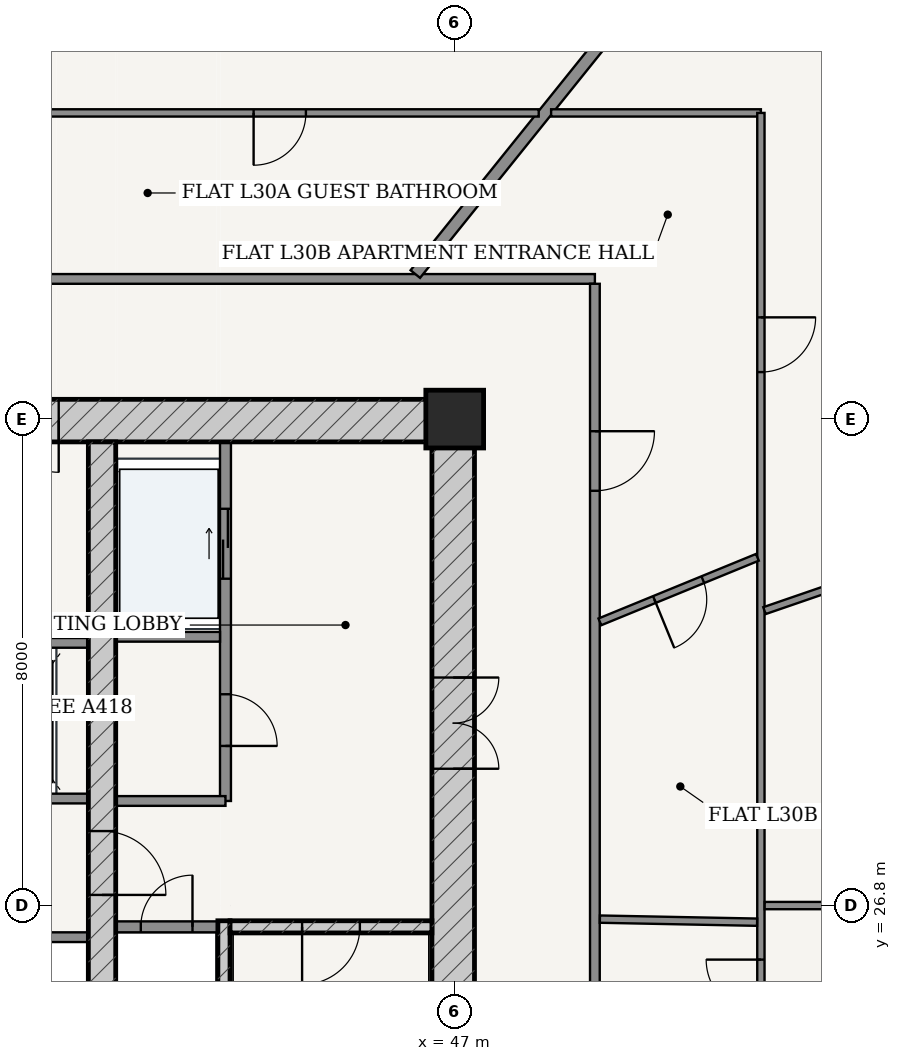
"""IFC4 building model, lengths in metres.
Left out: names, types, materials, properties, quantities, classifications, styles, units other than length and angle.
Written with IfcOpenShell. Run it as: python <this file> out.ifc"""

import sys

from ifc_helpers import new_model, si_unit, direction, frame, frame_2d, origin, origin_2d, place, context, subcontext, project, spatial, rectangle, extrude, source, transform, mapped, element, fill, save


model = new_model("IFC4")
c1 = context("Model", 3, precision=1e-05, world=origin(), true_north=direction((-0.2419218956, 0.970295726276)))
c2 = subcontext(c1, "Body", "Model", "MODEL_VIEW")
j1 = project(units=[si_unit("LENGTHUNIT", "METRE"), si_unit("PLANEANGLEUNIT", "RADIAN")], contexts=[c1])
p1 = place(None, origin())
s1 = spatial("IfcSite", under=j1, at=p1, CompositionType="ELEMENT")
p2 = place(p1, origin())
s2 = spatial("IfcBuilding", under=s1, at=p2, CompositionType="ELEMENT")
p3 = place(p2, frame((0.0, 0.0, 115.8)))
s3 = spatial("IfcBuildingStorey", under=s2, at=p3, CompositionType="ELEMENT", Elevation=115.8)
p4 = place(p3, frame((47.0, 34.8, 0.0), z_axis=(0.0, 0.0, 1.0), x_axis=(1.0, 0.0, 0.0)))
e1 = element("IfcColumn", 1, at=p4, inside=s3, PredefinedType="COLUMN", context=c2, shape_type="SweptSolid", body=[
    extrude(rectangle(XDim=0.95, YDim=0.95, at=origin_2d()), origin(), (0.0, 0.0, 1.0), 3.6),
])
p5 = place(p3, frame((28.675, 34.775, 0.0), z_axis=(0.0, 0.0, 1.0), x_axis=(1.0, 0.0, 0.0)))
e2 = element("IfcWall", 2, at=p5, inside=s3, PredefinedType="SHEAR", context=c2, shape_type="SweptSolid", body=[
    extrude(rectangle(XDim=18.65, YDim=0.7, at=frame_2d((9.325, 0.0))), origin(), (0.0, 0.0, 1.0), 3.325),
])
p6 = place(p5, frame((6.837, 0.0, 0.0)))
e3 = element("IfcOpeningElement", 3, at=p6, cuts=e2, PredefinedType="OPENING", context=c2, shape_type="SweptSolid", body=[
    extrude(rectangle(XDim=0.85, YDim=2.1, at=frame_2d((0.425, 1.05))), frame((0.0, 0.36, 0.0), z_axis=(0.0, -1.0, 0.0), x_axis=(1.0, 0.0, 0.0)), (0.0, 0.0, 1.0), 0.72),
])
p7 = place(p5, frame((8.895, 0.0, 0.0)))
e4 = element("IfcOpeningElement", 4, at=p7, cuts=e2, PredefinedType="OPENING", context=c2, shape_type="SweptSolid", body=[
    extrude(rectangle(XDim=0.86, YDim=2.1, at=frame_2d((0.43, 1.05))), frame((0.0, 0.36, 0.0), z_axis=(0.0, -1.0, 0.0), x_axis=(1.0, 0.0, 0.0)), (0.0, 0.0, 1.0), 0.72),
])
p8 = place(p5, frame((10.962, 0.0, 0.0)))
e5 = element("IfcOpeningElement", 5, at=p8, cuts=e2, PredefinedType="OPENING", context=c2, shape_type="SweptSolid", body=[
    extrude(rectangle(XDim=0.85, YDim=2.1, at=frame_2d((0.425, 1.05))), frame((0.0, 0.36, 0.0), z_axis=(0.0, -1.0, 0.0), x_axis=(1.0, 0.0, 0.0)), (0.0, 0.0, 1.0), 0.72),
])
p9 = place(p3, frame((46.975, 19.175, 0.0), z_axis=(0.0, 0.0, 1.0), x_axis=(0.0, 1.0, 0.0)))
e6 = element("IfcWall", 6, at=p9, inside=s3, PredefinedType="SHEAR", context=c2, shape_type="SweptSolid", body=[
    extrude(rectangle(XDim=15.25, YDim=0.7, at=frame_2d((7.625, 0.0))), origin(), (0.0, 0.0, 1.0), 3.325),
])
p10 = place(p9, frame((9.875, 0.0, 0.0)))
e7 = element("IfcOpeningElement", 7, at=p10, cuts=e6, PredefinedType="OPENING", context=c2, shape_type="SweptSolid", body=[
    extrude(rectangle(XDim=1.5, YDim=2.2, at=frame_2d((0.75, 1.1))), frame((0.0, 0.36, 0.0), z_axis=(0.0, -1.0, 0.0), x_axis=(1.0, 0.0, 0.0)), (0.0, 0.0, 1.0), 0.72),
])
p11 = place(p3, frame((43.205, 19.175, 0.0), z_axis=(0.0, 0.0, 1.0), x_axis=(0.0, 1.0, 0.0)))
e8 = element("IfcWall", 8, at=p11, inside=s3, PredefinedType="SOLIDWALL", context=c2, shape_type="SweptSolid", body=[
    extrude(rectangle(XDim=7.375, YDim=0.2, at=frame_2d((3.688, 0.0))), origin(), (0.0, 0.0, 1.0), 3.325),
])
p12 = place(p3, frame((43.305, 26.45, 0.0), z_axis=(0.0, 0.0, 1.0), x_axis=(1.0, 0.0, 0.0)))
e9 = element("IfcWall", 9, at=p12, inside=s3, PredefinedType="SOLIDWALL", context=c2, shape_type="SweptSolid", body=[
    extrude(rectangle(XDim=3.32, YDim=0.2, at=frame_2d((1.66, 0.0))), origin(), (0.0, 0.0, 1.0), 3.325),
])
p13 = place(p12, frame((1.185, 0.0, 0.0)))
e10 = element("IfcOpeningElement", 10, at=p13, cuts=e9, PredefinedType="OPENING", context=c2, shape_type="SweptSolid", body=[
    extrude(rectangle(XDim=0.95, YDim=2.15, at=frame_2d((0.475, 1.075))), frame((0.0, 0.11, 0.0), z_axis=(0.0, -1.0, 0.0), x_axis=(1.0, 0.0, 0.0)), (0.0, 0.0, 1.0), 0.22),
])
p14 = place(p3, frame((41.2, 19.175, 0.0), z_axis=(0.0, 0.0, 1.0), x_axis=(0.0, 1.0, 0.0)))
e11 = element("IfcWall", 11, at=p14, inside=s3, PredefinedType="SHEAR", context=c2, shape_type="SweptSolid", body=[
    extrude(rectangle(XDim=15.25, YDim=0.45, at=frame_2d((7.625, 0.0))), origin(), (0.0, 0.0, 1.0), 3.325),
])
p15 = place(p14, frame((7.8, 0.0, 0.0)))
e12 = element("IfcOpeningElement", 12, at=p15, cuts=e11, PredefinedType="OPENING", context=c2, shape_type="SweptSolid", body=[
    extrude(rectangle(XDim=1.05, YDim=2.15, at=frame_2d((0.525, 1.075))), frame((0.0, 0.235, 0.0), z_axis=(0.0, -1.0, 0.0), x_axis=(1.0, 0.0, 0.0)), (0.0, 0.0, 1.0), 0.47),
])
p16 = place(p3, frame((60.154, 39.01, 0.0), z_axis=(0.0, 0.0, 1.0), x_axis=(-0.769242574941, 0.638956853706, 0.0)))
e13 = element("IfcWall", 13, at=p16, inside=s3, PredefinedType="SOLIDWALL", context=c2, shape_type="SweptSolid", body=[
    extrude(rectangle(XDim=9.69, YDim=0.26, at=frame_2d((4.845, 0.0))), origin(), (0.0, 0.0, 1.0), 3.325),
])
p17 = place(p16, frame((4.17, 0.0, 0.0)))
e14 = element("IfcOpeningElement", 14, at=p17, cuts=e13, PredefinedType="OPENING", context=c2, shape_type="SweptSolid", body=[
    extrude(rectangle(XDim=1.35, YDim=2.2, at=frame_2d((0.675, 1.1))), frame((0.0, 0.14, 0.0), z_axis=(0.0, -1.0, 0.0), x_axis=(1.0, 0.0, 0.0)), (0.0, 0.0, 1.0), 0.28),
])
p18 = place(p3, frame((41.425, 26.45, 0.0), z_axis=(0.0, 0.0, 1.0), x_axis=(1.0, 0.0, 0.0)))
e15 = element("IfcWall", 15, at=p18, inside=s3, PredefinedType="PARTITIONING", context=c2, shape_type="SweptSolid", body=[
    extrude(rectangle(XDim=1.675, YDim=0.18, at=frame_2d((0.837, 0.0))), origin(), (0.0, 0.0, 1.0), 3.325),
])
p19 = place(p18, frame((0.413, 0.0, 0.0)))
e16 = element("IfcOpeningElement", 16, at=p19, cuts=e15, PredefinedType="OPENING", context=c2, shape_type="SweptSolid", body=[
    extrude(rectangle(XDim=0.85, YDim=2.1, at=frame_2d((0.425, 1.05))), frame((0.0, 0.1, 0.0), z_axis=(0.0, -1.0, 0.0), x_axis=(1.0, 0.0, 0.0)), (0.0, 0.0, 1.0), 0.2),
])
p20 = place(p3, frame((43.23, 28.52, 0.0), z_axis=(0.0, 0.0, 1.0), x_axis=(0.0, 1.0, 0.0)))
e17 = element("IfcWall", 17, at=p20, inside=s3, PredefinedType="PARTITIONING", context=c2, shape_type="SweptSolid", body=[
    extrude(rectangle(XDim=5.905, YDim=0.18, at=frame_2d((2.953, 0.0))), origin(), (0.0, 0.0, 1.0), 3.325),
])
p21 = place(p20, frame((0.905, 0.0, 0.0)))
e18 = element("IfcOpeningElement", 18, at=p21, cuts=e17, PredefinedType="OPENING", context=c2, shape_type="SweptSolid", body=[
    extrude(rectangle(XDim=0.85, YDim=2.1, at=frame_2d((0.425, 1.05))), frame((0.0, 0.1, 0.0), z_axis=(0.0, -1.0, 0.0), x_axis=(1.0, 0.0, 0.0)), (0.0, 0.0, 1.0), 0.2),
])
p22 = place(p20, frame((3.655, 0.0, 0.0)))
e19 = element("IfcOpeningElement", 19, at=p22, cuts=e17, PredefinedType="OPENING", context=c2, shape_type="SweptSolid", body=[
    extrude(rectangle(XDim=1.15, YDim=2.2, at=frame_2d((0.575, 1.1))), frame((0.0, 0.1, 0.0), z_axis=(0.0, -1.0, 0.0), x_axis=(1.0, 0.0, 0.0)), (0.0, 0.0, 1.0), 0.2),
])
p23 = place(p3, frame((41.425, 31.22, 0.0), z_axis=(0.0, 0.0, 1.0), x_axis=(1.0, 0.0, 0.0)))
e20 = element("IfcWall", 20, at=p23, inside=s3, PredefinedType="PARTITIONING", context=c2, shape_type="SweptSolid", body=[
    extrude(rectangle(XDim=1.715, YDim=0.16, at=frame_2d((0.857, 0.0))), origin(), (0.0, 0.0, 1.0), 3.325),
])
p24 = place(p3, frame((41.425, 28.52, 0.0), z_axis=(0.0, 0.0, 1.0), x_axis=(1.0, 0.0, 0.0)))
e21 = element("IfcWall", 21, at=p24, inside=s3, PredefinedType="PARTITIONING", context=c2, shape_type="SweptSolid", body=[
    extrude(rectangle(XDim=1.805, YDim=0.16, at=frame_2d((0.902, 0.0))), origin(), (0.0, 0.0, 1.0), 3.325),
])
p25 = place(p3, frame((35.025, 28.56, 0.0), z_axis=(0.0, 0.0, 1.0), x_axis=(1.0, 0.0, 0.0)))
e22 = element("IfcWall", 22, at=p25, inside=s3, PredefinedType="PARTITIONING", context=c2, shape_type="SweptSolid", body=[
    extrude(rectangle(XDim=5.95, YDim=0.16, at=frame_2d((2.975, 0.0))), origin(), (0.0, 0.0, 1.0), 3.325),
])
p26 = place(p25, frame((0.76, 0.0, 0.0)))
e23 = element("IfcOpeningElement", 23, at=p26, cuts=e22, PredefinedType="OPENING", context=c2, shape_type="SweptSolid", body=[
    extrude(rectangle(XDim=1.1, YDim=2.2, at=frame_2d((0.55, 1.1))), frame((0.0, 0.09, 0.0), z_axis=(0.0, -1.0, 0.0), x_axis=(1.0, 0.0, 0.0)), (0.0, 0.0, 1.0), 0.18),
])
p27 = place(p25, frame((2.425, 0.0, 0.0)))
e24 = element("IfcOpeningElement", 24, at=p27, cuts=e22, PredefinedType="OPENING", context=c2, shape_type="SweptSolid", body=[
    extrude(rectangle(XDim=1.1, YDim=2.2, at=frame_2d((0.55, 1.1))), frame((0.0, 0.09, 0.0), z_axis=(0.0, -1.0, 0.0), x_axis=(1.0, 0.0, 0.0)), (0.0, 0.0, 1.0), 0.18),
])
p28 = place(p25, frame((4.09, 0.0, 0.0)))
e25 = element("IfcOpeningElement", 25, at=p28, cuts=e22, PredefinedType="OPENING", context=c2, shape_type="SweptSolid", body=[
    extrude(rectangle(XDim=1.1, YDim=2.2, at=frame_2d((0.55, 1.1))), frame((0.0, 0.09, 0.0), z_axis=(0.0, -1.0, 0.0), x_axis=(1.0, 0.0, 0.0)), (0.0, 0.0, 1.0), 0.18),
])
for number, where, z_axis, x_axis in (
    (26, (35.025, 31.12, 0.0), (0.0, 0.0, 1.0), (1.0, 0.0, 0.0)),
    (27, (35.025, 26.28, 0.0), (0.0, 0.0, 1.0), (1.0, 0.0, 0.0)),
):
    element("IfcWall", number, at=place(p3, frame(where, z_axis=z_axis, x_axis=x_axis)), inside=s3, PredefinedType="PARTITIONING", context=c2, shape_type="SweptSolid", body=[
        extrude(rectangle(XDim=5.95, YDim=0.16, at=frame_2d((2.975, 0.0))), origin(), (0.0, 0.0, 1.0), 3.325),
    ])
p29 = place(p3, frame((26.695, 37.105, 0.0), z_axis=(0.0, 0.0, 1.0), x_axis=(1.0, 0.0, 0.0)))
e28 = element("IfcWall", 28, at=p29, inside=s3, PredefinedType="PARTITIONING", context=c2, shape_type="SweptSolid", body=[
    extrude(rectangle(XDim=22.61, YDim=0.16, at=frame_2d((11.305, 0.0))), origin(), (0.0, 0.0, 1.0), 2.767),
])
p30 = place(p3, frame((49.305, 16.575, 0.0), z_axis=(0.0, 0.0, 1.0), x_axis=(0.0, 1.0, 0.0)))
e29 = element("IfcWall", 29, at=p30, inside=s3, PredefinedType="PARTITIONING", context=c2, shape_type="SweptSolid", body=[
    extrude(rectangle(XDim=20.45, YDim=0.16, at=frame_2d((10.225, 0.0))), origin(), (0.0, 0.0, 1.0), 2.767),
])
p31 = place(p30, frame((17.046, 0.0, 0.0)))
e30 = element("IfcOpeningElement", 30, at=p31, cuts=e29, PredefinedType="OPENING", context=c2, shape_type="SweptSolid", body=[
    extrude(rectangle(XDim=0.98, YDim=2.2, at=frame_2d((0.49, 1.1))), frame((0.0, 0.09, 0.0), z_axis=(0.0, -1.0, 0.0), x_axis=(1.0, 0.0, 0.0)), (0.0, 0.0, 1.0), 0.18),
])
p32 = place(p3, frame((46.352, 37.185, 0.0), z_axis=(0.0, 0.0, 1.0), x_axis=(0.626712884514, 0.779250255299, 0.0)))
e31 = element("IfcWall", 31, at=p32, inside=s3, PredefinedType="PARTITIONING", context=c2, shape_type="SweptSolid", body=[
    extrude(rectangle(XDim=10.141, YDim=0.2, at=frame_2d((5.07, 0.0))), origin(), (0.0, 0.0, 1.0), 2.767),
])
p33 = place(p3, frame((23.965, 39.835, 0.0), z_axis=(0.0, 0.0, 1.0), x_axis=(1.0, 0.0, 0.0)))
e32 = element("IfcWall", 32, at=p33, inside=s3, PredefinedType="PARTITIONING", context=c2, shape_type="SweptSolid", body=[
    extrude(rectangle(XDim=24.416, YDim=0.12, at=frame_2d((12.208, 0.0))), origin(), (0.0, 0.0, 1.0), 2.767),
])
p34 = place(p33, frame((4.192, 0.0, 0.0)))
e33 = element("IfcOpeningElement", 33, at=p34, cuts=e32, PredefinedType="OPENING", context=c2, shape_type="SweptSolid", body=[
    extrude(rectangle(XDim=0.9, YDim=2.15, at=frame_2d((0.45, 1.075))), frame((0.0, 0.07, 0.0), z_axis=(0.0, -1.0, 0.0), x_axis=(1.0, 0.0, 0.0)), (0.0, 0.0, 1.0), 0.14),
])
p35 = place(p33, frame((19.728, 0.0, 0.0)))
e34 = element("IfcOpeningElement", 34, at=p35, cuts=e32, PredefinedType="OPENING", context=c2, shape_type="SweptSolid", body=[
    extrude(rectangle(XDim=0.86, YDim=2.15, at=frame_2d((0.43, 1.075))), frame((0.0, 0.07, 0.0), z_axis=(0.0, -1.0, 0.0), x_axis=(1.0, 0.0, 0.0)), (0.0, 0.0, 1.0), 0.14),
])
p36 = place(p3, frame((48.585, 39.835, 0.0), z_axis=(0.0, 0.0, 1.0), x_axis=(1.0, 0.0, 0.0)))
e35 = element("IfcWall", 35, at=p36, inside=s3, PredefinedType="PARTITIONING", context=c2, shape_type="SweptSolid", body=[
    extrude(rectangle(XDim=3.45, YDim=0.12, at=frame_2d((1.725, 0.0))), origin(), (0.0, 0.0, 1.0), 2.767),
])
p37 = place(p3, frame((52.035, 39.835, 0.0), z_axis=(0.0, 0.0, 1.0), x_axis=(0.0, -1.0, 0.0)))
e36 = element("IfcWall", 36, at=p37, inside=s3, PredefinedType="PARTITIONING", context=c2, shape_type="SweptSolid", body=[
    extrude(rectangle(XDim=26.07, YDim=0.12, at=frame_2d((13.035, 0.0))), origin(), (0.0, 0.0, 1.0), 2.767),
])
p38 = place(p37, frame((3.362, 0.0, 0.0)))
e37 = element("IfcOpeningElement", 37, at=p38, cuts=e36, PredefinedType="OPENING", context=c2, shape_type="SweptSolid", body=[
    extrude(rectangle(XDim=0.9, YDim=2.15, at=frame_2d((0.45, 1.075))), frame((0.0, 0.07, 0.0), z_axis=(0.0, -1.0, 0.0), x_axis=(1.0, 0.0, 0.0)), (0.0, 0.0, 1.0), 0.14),
])
p39 = place(p37, frame((13.924, 0.0, 0.0)))
e38 = element("IfcOpeningElement", 38, at=p39, cuts=e36, PredefinedType="OPENING", context=c2, shape_type="SweptSolid", body=[
    extrude(rectangle(XDim=0.9, YDim=2.15, at=frame_2d((0.45, 1.075))), frame((0.0, 0.07, 0.0), z_axis=(0.0, -1.0, 0.0), x_axis=(1.0, 0.0, 0.0)), (0.0, 0.0, 1.0), 0.14),
])
p40 = place(p3, frame((52.097, 26.8, 0.0), z_axis=(0.0, 0.0, 1.0), x_axis=(1.0, 0.0, 0.0)))
e39 = element("IfcWall", 39, at=p40, inside=s3, PredefinedType="PARTITIONING", context=c2, shape_type="SweptSolid", body=[
    extrude(rectangle(XDim=12.443, YDim=0.12, at=frame_2d((6.222, 0.0))), origin(), (0.0, 0.0, 1.0), 2.767),
])
p41 = place(p40, frame((5.771, 0.0, 0.0)))
e40 = element("IfcOpeningElement", 40, at=p41, cuts=e39, PredefinedType="OPENING", context=c2, shape_type="SweptSolid", body=[
    extrude(rectangle(XDim=0.9, YDim=2.15, at=frame_2d((0.45, 1.075))), frame((0.0, 0.07, 0.0), z_axis=(0.0, -1.0, 0.0), x_axis=(1.0, 0.0, 0.0)), (0.0, 0.0, 1.0), 0.14),
])
p42 = place(p3, frame((52.094, 31.65, 0.0), z_axis=(0.0, 0.0, 1.0), x_axis=(0.945573120726, 0.32540970078, 0.0)))
e41 = element("IfcWall", 41, at=p42, inside=s3, PredefinedType="PARTITIONING", context=c2, shape_type="SweptSolid", body=[
    extrude(rectangle(XDim=11.022, YDim=0.12, at=frame_2d((5.511, 0.0))), origin(), (0.0, 0.0, 1.0), 2.767),
])
p43 = place(p42, frame((5.061, 0.0, 0.0)))
e42 = element("IfcOpeningElement", 42, at=p43, cuts=e41, PredefinedType="OPENING", context=c2, shape_type="SweptSolid", body=[
    extrude(rectangle(XDim=0.9, YDim=2.15, at=frame_2d((0.45, 1.075))), frame((0.0, 0.07, 0.0), z_axis=(0.0, -1.0, 0.0), x_axis=(1.0, 0.0, 0.0)), (0.0, 0.0, 1.0), 0.14),
])
p44 = place(p3, frame((49.387, 26.577, 0.0), z_axis=(0.0, 0.0, 1.0), x_axis=(0.999807240787, -0.019633676934, 0.0)))
e43 = element("IfcWall", 43, at=p44, inside=s3, PredefinedType="PARTITIONING", context=c2, shape_type="SweptSolid", body=[
    extrude(rectangle(XDim=2.586, YDim=0.12, at=frame_2d((1.293, 0.0))), origin(), (0.0, 0.0, 1.0), 3.325),
])
p45 = place(p3, frame((49.387, 31.465, 0.0), z_axis=(0.0, 0.0, 1.0), x_axis=(0.925328713836, 0.37916588896, 0.0)))
e44 = element("IfcWall", 44, at=p45, inside=s3, PredefinedType="PARTITIONING", context=c2, shape_type="SweptSolid", body=[
    extrude(rectangle(XDim=2.8, YDim=0.12, at=frame_2d((1.4, 0.0))), origin(), (0.0, 0.0, 1.0), 3.325),
])
p46 = place(p45, frame((0.97, 0.0, 0.0)))
e45 = element("IfcOpeningElement", 45, at=p46, cuts=e44, PredefinedType="OPENING", context=c2, shape_type="SweptSolid", body=[
    extrude(rectangle(XDim=0.86, YDim=2.15, at=frame_2d((0.43, 1.075))), frame((0.0, 0.07, 0.0), z_axis=(0.0, -1.0, 0.0), x_axis=(1.0, 0.0, 0.0)), (0.0, 0.0, 1.0), 0.14),
])
m1 = source(origin(), c2, "Body", "SweptSolid", [
    extrude(rectangle(XDim=1.5, YDim=2.2, at=frame_2d((0.75, 1.1))), frame((0.0, 0.025, 0.0), z_axis=(0.0, -1.0, 0.0), x_axis=(1.0, 0.0, 0.0)), (0.0, 0.0, 1.0), 0.05),
])
p47 = place(p10, frame((1.5, 0.0, 0.0), z_axis=(0.0, 0.0, 1.0), x_axis=(-1.0, 0.0, 0.0)))
e46 = element("IfcDoor", 46, at=p47, inside=s3, OperationType="DOUBLE_DOOR_SINGLE_SWING", PredefinedType="DOOR", context=c2, shape_type="MappedRepresentation", body=[
    mapped(m1, transform((0.0, 0.0, 0.0), scale=1.0)),
])
fill(e7, e46)
m2 = source(origin(), c2, "Body", "SweptSolid", [
    extrude(rectangle(XDim=1.05, YDim=2.15, at=frame_2d((0.525, 1.075))), frame((0.0, 0.025, 0.0), z_axis=(0.0, -1.0, 0.0), x_axis=(1.0, 0.0, 0.0)), (0.0, 0.0, 1.0), 0.05),
])
p48 = place(p15, frame((1.05, 0.0, 0.0), z_axis=(0.0, 0.0, 1.0), x_axis=(-1.0, 0.0, 0.0)))
e47 = element("IfcDoor", 47, at=p48, inside=s3, OperationType="SINGLE_SWING_RIGHT", PredefinedType="DOOR", context=c2, shape_type="MappedRepresentation", body=[
    mapped(m2, transform((0.0, 0.0, 0.0), scale=1.0)),
])
fill(e12, e47)
m3 = source(origin(), c2, "Body", "SweptSolid", [
    extrude(rectangle(XDim=0.95, YDim=2.15, at=frame_2d((0.475, 1.075))), frame((0.0, 0.025, 0.0), z_axis=(0.0, -1.0, 0.0), x_axis=(1.0, 0.0, 0.0)), (0.0, 0.0, 1.0), 0.05),
])
p49 = place(p13, frame((0.95, 0.0, 0.0), z_axis=(0.0, 0.0, 1.0), x_axis=(-1.0, 0.0, 0.0)))
e48 = element("IfcDoor", 48, at=p49, inside=s3, OperationType="SINGLE_SWING_RIGHT", PredefinedType="DOOR", context=c2, shape_type="MappedRepresentation", body=[
    mapped(m3, transform((0.0, 0.0, 0.0), scale=1.0)),
])
fill(e10, e48)
m4 = source(origin(), c2, "Body", "SweptSolid", [
    extrude(rectangle(XDim=0.85, YDim=2.1, at=frame_2d((0.425, 1.05))), frame((0.0, 0.025, 0.0), z_axis=(0.0, -1.0, 0.0), x_axis=(1.0, 0.0, 0.0)), (0.0, 0.0, 1.0), 0.05),
])
p50 = place(p19, origin())
e49 = element("IfcDoor", 49, at=p50, inside=s3, OperationType="SINGLE_SWING_RIGHT", PredefinedType="DOOR", context=c2, shape_type="MappedRepresentation", body=[
    mapped(m4, transform((0.0, 0.0, 0.0), scale=1.0)),
])
fill(e16, e49)
p51 = place(p21, frame((0.85, 0.0, 0.0), z_axis=(0.0, 0.0, 1.0), x_axis=(-1.0, 0.0, 0.0)))
e50 = element("IfcDoor", 50, at=p51, inside=s3, OperationType="SINGLE_SWING_RIGHT", PredefinedType="DOOR", context=c2, shape_type="MappedRepresentation", body=[
    mapped(m4, transform((0.0, 0.0, 0.0), scale=1.0)),
])
fill(e18, e50)
p52 = place(p8, frame((0.85, 0.0, 0.0), z_axis=(0.0, 0.0, 1.0), x_axis=(-1.0, 0.0, 0.0)))
e51 = element("IfcDoor", 51, at=p52, inside=s3, OperationType="SINGLE_SWING_LEFT", PredefinedType="DOOR", context=c2, shape_type="MappedRepresentation", body=[
    mapped(m4, transform((0.0, 0.0, 0.0), scale=1.0)),
])
fill(e5, e51)
m5 = source(origin(), c2, "Body", "SweptSolid", [
    extrude(rectangle(XDim=1.15, YDim=2.2, at=frame_2d((0.575, 1.1))), frame((0.0, 0.025, 0.0), z_axis=(0.0, -1.0, 0.0), x_axis=(1.0, 0.0, 0.0)), (0.0, 0.0, 1.0), 0.05),
])
p53 = place(p22, origin())
e52 = element("IfcDoor", 52, at=p53, inside=s3, OperationType="DOUBLE_DOOR_SLIDING", PredefinedType="DOOR", context=c2, shape_type="MappedRepresentation", body=[
    mapped(m5, transform((0.0, 0.0, 0.0), scale=1.0)),
])
fill(e19, e52)
m6 = source(origin(), c2, "Body", "SweptSolid", [
    extrude(rectangle(XDim=0.86, YDim=2.15, at=frame_2d((0.43, 1.075))), frame((0.0, 0.025, 0.0), z_axis=(0.0, -1.0, 0.0), x_axis=(1.0, 0.0, 0.0)), (0.0, 0.0, 1.0), 0.05),
])
p54 = place(p35, frame((0.86, 0.0, 0.0), z_axis=(0.0, 0.0, 1.0), x_axis=(-1.0, 0.0, 0.0)))
e53 = element("IfcDoor", 53, at=p54, inside=s3, OperationType="SINGLE_SWING_RIGHT", PredefinedType="DOOR", context=c2, shape_type="MappedRepresentation", body=[
    mapped(m6, transform((0.0, 0.0, 0.0), scale=1.0)),
])
fill(e34, e53)
m7 = source(origin(), c2, "Body", "SweptSolid", [
    extrude(rectangle(XDim=0.98, YDim=2.2, at=frame_2d((0.49, 1.1))), frame((0.0, 0.025, 0.0), z_axis=(0.0, -1.0, 0.0), x_axis=(1.0, 0.0, 0.0)), (0.0, 0.0, 1.0), 0.05),
])
p55 = place(p31, frame((0.98, 0.0, 0.0), z_axis=(0.0, 0.0, 1.0), x_axis=(-1.0, 0.0, 0.0)))
e54 = element("IfcDoor", 54, at=p55, inside=s3, OperationType="SINGLE_SWING_LEFT", PredefinedType="DOOR", context=c2, shape_type="MappedRepresentation", body=[
    mapped(m7, transform((0.0, 0.0, 0.0), scale=1.0)),
])
fill(e30, e54)
p56 = place(p46, frame((0.86, 0.0, 0.0), z_axis=(0.0, 0.0, 1.0), x_axis=(-1.0, 0.0, 0.0)))
e55 = element("IfcDoor", 55, at=p56, inside=s3, OperationType="SINGLE_SWING_RIGHT", PredefinedType="DOOR", context=c2, shape_type="MappedRepresentation", body=[
    mapped(m6, transform((0.0, 0.0, 0.0), scale=1.0)),
])
fill(e45, e55)
m8 = source(origin(), c2, "Body", "SweptSolid", [
    extrude(rectangle(XDim=0.9, YDim=2.15, at=frame_2d((0.45, 1.075))), frame((0.0, 0.025, 0.0), z_axis=(0.0, -1.0, 0.0), x_axis=(1.0, 0.0, 0.0)), (0.0, 0.0, 1.0), 0.05),
])
p57 = place(p38, origin())
e56 = element("IfcDoor", 56, at=p57, inside=s3, OperationType="SINGLE_SWING_LEFT", PredefinedType="DOOR", context=c2, shape_type="MappedRepresentation", body=[
    mapped(m8, transform((0.0, 0.0, 0.0), scale=1.0)),
])
fill(e37, e56)
p58 = place(p39, frame((0.9, 0.0, 0.0), z_axis=(0.0, 0.0, 1.0), x_axis=(-1.0, 0.0, 0.0)))
e57 = element("IfcDoor", 57, at=p58, inside=s3, OperationType="SINGLE_SWING_RIGHT", PredefinedType="DOOR", context=c2, shape_type="MappedRepresentation", body=[
    mapped(m8, transform((0.0, 0.0, 0.0), scale=1.0)),
])
fill(e38, e57)
save(model, sys.argv[1])
